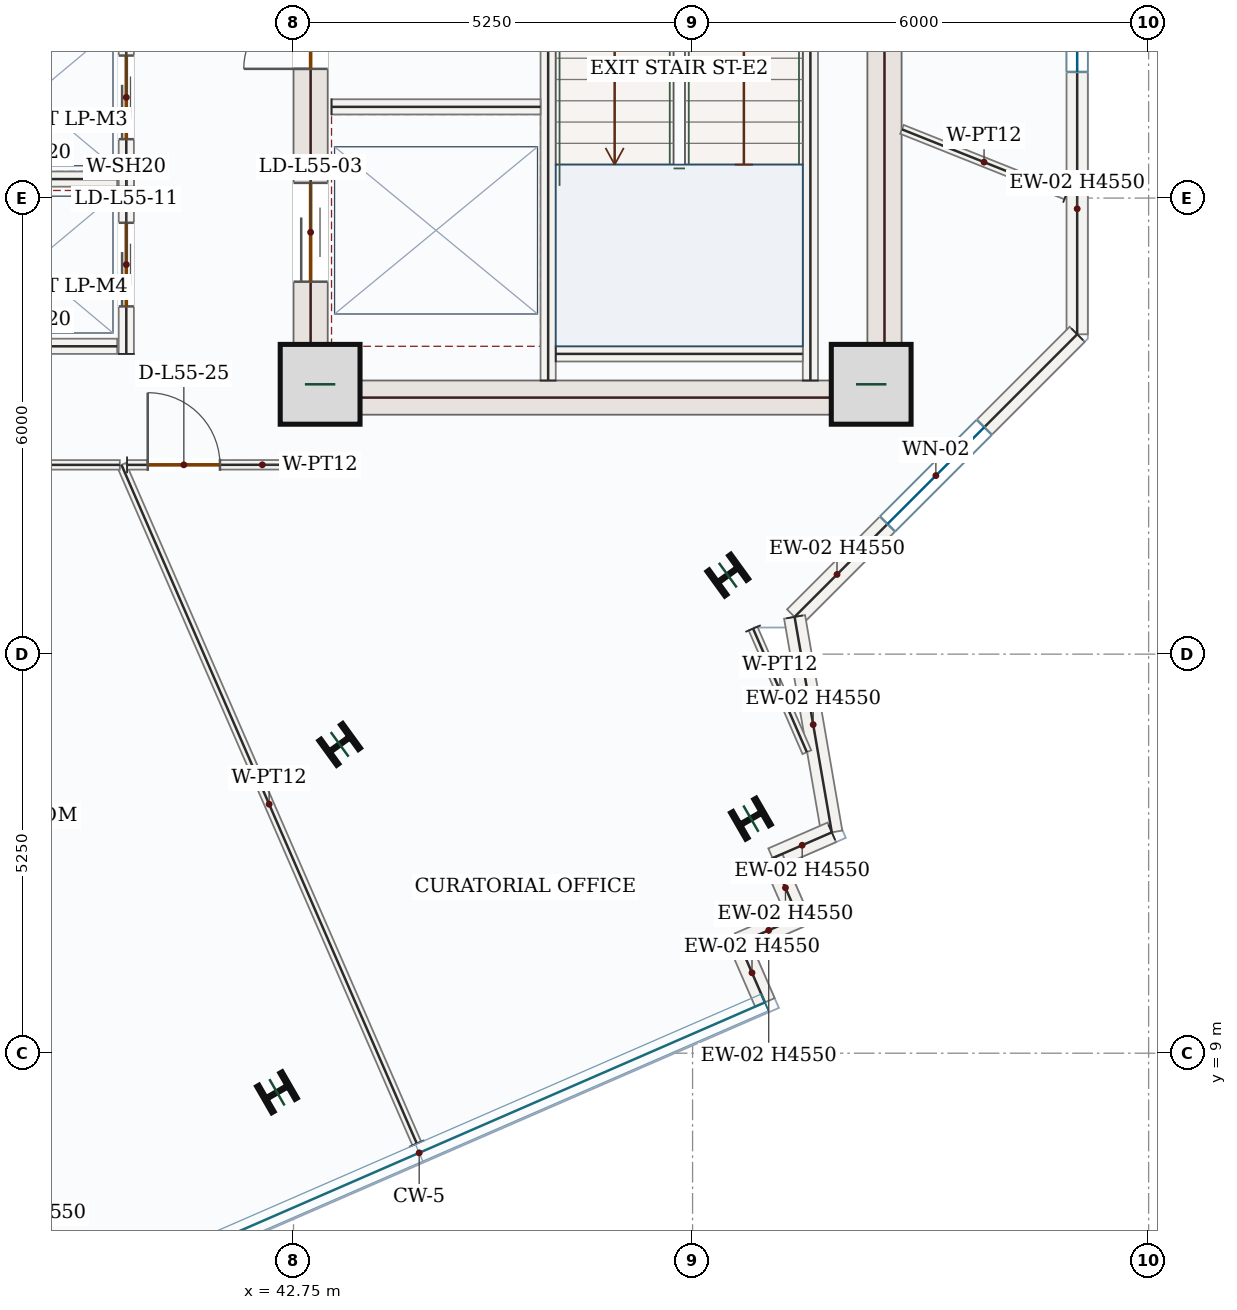
"""IFC4 building model, lengths in metres.
Left out: names, types, materials, properties, quantities, classifications, styles, units other than length and angle.
Written with IfcOpenShell. Run it as: python <this file> out.ifc"""

import sys

from ifc_helpers import new_model, si_unit, direction, frame, frame_2d, origin, origin_2d, place, context, subcontext, project, spatial, rectangle, i_section, extrude, source, transform, mapped, element, fill, save


model = new_model("IFC4")
c1 = context("Model", 3, precision=1e-05, world=origin(), true_north=direction((0.0, 1.0)))
c2 = subcontext(c1, "Body", "Model", "MODEL_VIEW")
j1 = project(units=[si_unit("LENGTHUNIT", "METRE"), si_unit("PLANEANGLEUNIT", "RADIAN")], contexts=[c1])
p1 = place(None, origin())
s1 = spatial("IfcSite", under=j1, at=p1, CompositionType="ELEMENT")
p2 = place(p1, origin())
s2 = spatial("IfcBuilding", under=s1, at=p2, CompositionType="ELEMENT")
p3 = place(p2, frame((0.0, 0.0, 234.3)))
s3 = spatial("IfcBuildingStorey", under=s2, at=p3, CompositionType="ELEMENT", Elevation=234.3)
p4 = place(p3, frame((42.975, 17.4, 0.0), z_axis=(0.0, 0.0, 1.0), x_axis=(0.0, 1.0, 0.0)))
e1 = element("IfcWall", 1, at=p4, inside=s3, PredefinedType="SHEAR", context=c2, shape_type="SweptSolid", body=[
    extrude(rectangle(XDim=8.55, YDim=0.45, at=frame_2d((4.275, 0.0))), origin(), (0.0, 0.0, 1.0), 4.55),
])
p5 = place(p4, frame((6.65, 0.0, 0.0)))
e2 = element("IfcOpeningElement", 2, at=p5, cuts=e1, PredefinedType="OPENING", context=c2, shape_type="SweptSolid", body=[
    extrude(rectangle(XDim=1.1, YDim=2.2, at=frame_2d((0.55, 1.1))), frame((0.0, 0.235, 0.0), z_axis=(0.0, -1.0, 0.0), x_axis=(1.0, 0.0, 0.0)), (0.0, 0.0, 1.0), 0.47),
])
p6 = place(p4, frame((1.75, 0.0, 0.0)))
e3 = element("IfcOpeningElement", 3, at=p6, cuts=e1, PredefinedType="OPENING", context=c2, shape_type="SweptSolid", body=[
    extrude(rectangle(XDim=1.3, YDim=2.2, at=frame_2d((0.65, 1.1))), frame((0.0, 0.235, 0.0), z_axis=(0.0, -1.0, 0.0), x_axis=(1.0, 0.0, 0.0)), (0.0, 0.0, 1.0), 0.47),
])
p7 = place(p4, frame((4.55, 0.0, 0.0)))
e4 = element("IfcOpeningElement", 4, at=p7, cuts=e1, PredefinedType="OPENING", context=c2, shape_type="SweptSolid", body=[
    extrude(rectangle(XDim=0.88, YDim=2.1, at=frame_2d((0.44, 1.05))), frame((0.0, 0.235, 0.0), z_axis=(0.0, -1.0, 0.0), x_axis=(1.0, 0.0, 0.0)), (0.0, 0.0, 1.0), 0.47),
])
m1 = source(origin(), c2, "Body", "SweptSolid", [
    extrude(rectangle(XDim=8.55, YDim=0.45, at=frame_2d((4.275, 0.0))), origin(), (0.0, 0.0, 1.0), 4.55),
])
p8 = place(p3, frame((50.525, 17.4, 0.0), z_axis=(0.0, 0.0, 1.0), x_axis=(0.0, 1.0, 0.0)))
e5 = element("IfcWall", 5, at=p8, inside=s3, PredefinedType="SHEAR", context=c2, shape_type="MappedRepresentation", body=[
    mapped(m1, transform((0.0, 0.0, 0.0), x_axis=(1.0, 0.0, 0.0), y_axis=(0.0, 1.0, 0.0), z_axis=(0.0, 0.0, 1.0), scale=1.0)),
])
m2 = source(origin(), c2, "Body", "SweptSolid", [
    extrude(rectangle(XDim=7.1, YDim=0.45, at=frame_2d((3.55, 0.0))), origin(), (0.0, 0.0, 1.0), 4.55),
])
p9 = place(p3, frame((43.2, 17.625, 0.0), z_axis=(0.0, 0.0, 1.0), x_axis=(1.0, 0.0, 0.0)))
e6 = element("IfcWall", 6, at=p9, inside=s3, PredefinedType="SHEAR", context=c2, shape_type="MappedRepresentation", body=[
    mapped(m2, transform((0.0, 0.0, 0.0), x_axis=(1.0, 0.0, 0.0), y_axis=(0.0, 1.0, 0.0), z_axis=(0.0, 0.0, 1.0), scale=1.0)),
])
m3 = source(origin(), c2, "Body", "SweptSolid", [
    extrude(rectangle(XDim=1.05, YDim=1.05, at=origin_2d()), origin(), (0.0, 0.0, 1.0), 4.8),
])
for number, where, z_axis, x_axis in (
    (7, (43.1, 17.8, 0.0), (0.0, 0.0, 1.0), (1.0, 0.0, 0.0)),
    (8, (50.35, 17.8, 0.0), (0.0, 0.0, 1.0), (1.0, 0.0, 0.0)),
):
    element("IfcColumn", number, at=place(p3, frame(where, z_axis=z_axis, x_axis=x_axis)), inside=s3, PredefinedType="COLUMN", context=c2, shape_type="MappedRepresentation", body=[
        mapped(m3, transform((0.0, 0.0, 0.0), x_axis=(1.0, 0.0, 0.0), y_axis=(0.0, 1.0, 0.0), z_axis=(0.0, 0.0, 1.0), scale=1.0)),
    ])
m4 = source(origin(), c2, "Body", "SweptSolid", [
    extrude(i_section(OverallWidth=0.399, OverallDepth=0.386, WebThickness=0.021, FlangeThickness=0.033, FilletRadius=0.018, at=origin_2d()), origin(), (0.0, 0.0, 1.0), 4.8),
])
for number, where, z_axis, x_axis in (
    (9, (43.357, 13.063, 0.0), (0.0, 0.0, 1.0), (-0.588, 0.809, 0.0)),
    (10, (48.464, 15.289, 0.0), (0.0, 0.0, 1.0), (-0.588, 0.809, 0.0)),
    (11, (42.532, 8.486, 0.0), (0.0, 0.0, 1.0), (-0.5, 0.866, 0.0)),
    (12, (48.768, 12.086, 0.0), (0.0, 0.0, 1.0), (-0.5, 0.866, 0.0)),
):
    element("IfcColumn", number, at=place(p3, frame(where, z_axis=z_axis, x_axis=x_axis)), inside=s3, PredefinedType="COLUMN", context=c2, shape_type="MappedRepresentation", body=[
        mapped(m4, transform((0.0, 0.0, 0.0), x_axis=(1.0, 0.0, 0.0), y_axis=(0.0, 1.0, 0.0), z_axis=(0.0, 0.0, 1.0), scale=1.0)),
    ])
p10 = place(p3, frame((53.06, 27.161, 0.0), z_axis=(0.0, 0.0, 1.0), x_axis=(0.0, -1.0, 0.0)))
e13 = element("IfcWall", 13, at=p10, inside=s3, PredefinedType="SOLIDWALL", context=c2, shape_type="SweptSolid", body=[
    extrude(rectangle(XDim=8.703, YDim=0.28, at=frame_2d((4.351, 0.0))), origin(), (0.0, 0.0, 1.0), 4.55),
])
p11 = place(p10, frame((3.451, 0.0, 0.85)))
e14 = element("IfcOpeningElement", 14, at=p11, cuts=e13, PredefinedType="OPENING", context=c2, shape_type="SweptSolid", body=[
    extrude(rectangle(XDim=1.8, YDim=1.75, at=frame_2d((0.9, 0.875))), frame((0.0, 0.15, 0.0), z_axis=(0.0, -1.0, 0.0), x_axis=(1.0, 0.0, 0.0)), (0.0, 0.0, 1.0), 0.3),
])
p12 = place(p3, frame((53.06, 18.458, 0.0), z_axis=(0.0, 0.0, 1.0), x_axis=(-0.707106781187, -0.707106781187, 0.0)))
e15 = element("IfcWall", 15, at=p12, inside=s3, PredefinedType="SOLIDWALL", context=c2, shape_type="SweptSolid", body=[
    extrude(rectangle(XDim=5.258, YDim=0.28, at=frame_2d((2.629, 0.0))), origin(), (0.0, 0.0, 1.0), 4.55),
])
p13 = place(p12, frame((1.729, 0.0, 0.85)))
e16 = element("IfcOpeningElement", 16, at=p13, cuts=e15, PredefinedType="OPENING", context=c2, shape_type="SweptSolid", body=[
    extrude(rectangle(XDim=1.8, YDim=1.75, at=frame_2d((0.9, 0.875))), frame((0.0, 0.15, 0.0), z_axis=(0.0, -1.0, 0.0), x_axis=(1.0, 0.0, 0.0)), (0.0, 0.0, 1.0), 0.3),
])
m5 = source(origin(), c2, "Body", "SweptSolid", [
    extrude(rectangle(XDim=2.876, YDim=0.28, at=frame_2d((1.438, 0.0))), origin(), (0.0, 0.0, 1.0), 4.55),
])
p14 = place(p3, frame((49.342, 14.74, 0.0), z_axis=(0.0, 0.0, 1.0), x_axis=(0.170259342901, -0.985399287677, 0.0)))
e17 = element("IfcWall", 17, at=p14, inside=s3, PredefinedType="SOLIDWALL", context=c2, shape_type="MappedRepresentation", body=[
    mapped(m5, transform((0.0, 0.0, 0.0), x_axis=(1.0, 0.0, 0.0), y_axis=(0.0, 1.0, 0.0), z_axis=(0.0, 0.0, 1.0), scale=1.0)),
])
m6 = source(origin(), c2, "Body", "SweptSolid", [
    extrude(rectangle(XDim=0.85, YDim=0.28, at=frame_2d((0.425, 0.0))), origin(), (0.0, 0.0, 1.0), 4.55),
])
p15 = place(p3, frame((49.832, 11.906, 0.0), z_axis=(0.0, 0.0, 1.0), x_axis=(-0.916841582309, -0.399251190291, 0.0)))
e18 = element("IfcWall", 18, at=p15, inside=s3, PredefinedType="SOLIDWALL", context=c2, shape_type="MappedRepresentation", body=[
    mapped(m6, transform((0.0, 0.0, 0.0), x_axis=(1.0, 0.0, 0.0), y_axis=(0.0, 1.0, 0.0), z_axis=(0.0, 0.0, 1.0), scale=1.0)),
])
m7 = source(origin(), c2, "Body", "SweptSolid", [
    extrude(rectangle(XDim=0.85, YDim=0.28, at=frame_2d((0.425, 0.0))), origin(), (0.0, 0.0, 1.0), 4.55),
])
for number, where, z_axis, x_axis in (
    (19, (49.052, 11.566, 0.0), (0.0, 0.0, 1.0), (0.399, -0.917, 0.0)),
    (20, (49.392, 10.787, 0.0), (0.0, 0.0, 1.0), (-0.917, -0.399, 0.0)),
):
    element("IfcWall", number, at=place(p3, frame(where, z_axis=z_axis, x_axis=x_axis)), inside=s3, PredefinedType="SOLIDWALL", context=c2, shape_type="MappedRepresentation", body=[
        mapped(m7, transform((0.0, 0.0, 0.0), x_axis=(1.0, 0.0, 0.0), y_axis=(0.0, 1.0, 0.0), z_axis=(0.0, 0.0, 1.0), scale=1.0)),
    ])
p16 = place(p3, frame((48.612, 10.448, 0.0), z_axis=(0.0, 0.0, 1.0), x_axis=(0.398904626351, -0.916992420403, 0.0)))
e21 = element("IfcWall", 21, at=p16, inside=s3, PredefinedType="SOLIDWALL", context=c2, shape_type="MappedRepresentation", body=[
    mapped(m6, transform((0.0, 0.0, 0.0), x_axis=(1.0, 0.0, 0.0), y_axis=(0.0, 1.0, 0.0), z_axis=(0.0, 0.0, 1.0), scale=1.0)),
])
m8 = source(origin(), c2, "Body", "SweptSolid", [
    extrude(rectangle(XDim=7.87, YDim=0.2, at=frame_2d((3.935, 0.0))), origin(), (0.0, 0.0, 1.0), 4.55),
])
p17 = place(p3, frame((49.55, 17.85, 0.0), z_axis=(0.0, 0.0, 1.0), x_axis=(0.0, 1.0, 0.0)))
e22 = element("IfcWall", 22, at=p17, inside=s3, PredefinedType="SOLIDWALL", context=c2, shape_type="MappedRepresentation", body=[
    mapped(m8, transform((0.0, 0.0, 0.0), x_axis=(1.0, 0.0, 0.0), y_axis=(0.0, 1.0, 0.0), z_axis=(0.0, 0.0, 1.0), scale=1.0)),
])
p18 = place(p3, frame((46.1, 17.85, 0.0), z_axis=(0.0, 0.0, 1.0), x_axis=(0.0, 1.0, 0.0)))
e23 = element("IfcWall", 23, at=p18, inside=s3, PredefinedType="SOLIDWALL", context=c2, shape_type="SweptSolid", body=[
    extrude(rectangle(XDim=8.0, YDim=0.2, at=frame_2d((4.0, 0.0))), origin(), (0.0, 0.0, 1.0), 4.55),
])
p19 = place(p18, frame((6.3, 0.0, 0.0)))
e24 = element("IfcOpeningElement", 24, at=p19, cuts=e23, PredefinedType="OPENING", context=c2, shape_type="SweptSolid", body=[
    extrude(rectangle(XDim=1.05, YDim=2.15, at=frame_2d((0.525, 1.075))), frame((0.0, 0.11, 0.0), z_axis=(0.0, -1.0, 0.0), x_axis=(1.0, 0.0, 0.0)), (0.0, 0.0, 1.0), 0.22),
])
m9 = source(origin(), c2, "Body", "SweptSolid", [
    extrude(rectangle(XDim=3.25, YDim=0.2, at=frame_2d((1.625, 0.0))), origin(), (0.0, 0.0, 1.0), 4.55),
])
p20 = place(p3, frame((46.2, 18.2, 0.0), z_axis=(0.0, 0.0, 1.0), x_axis=(1.0, 0.0, 0.0)))
e25 = element("IfcWall", 25, at=p20, inside=s3, PredefinedType="SOLIDWALL", context=c2, shape_type="MappedRepresentation", body=[
    mapped(m9, transform((0.0, 0.0, 0.0), x_axis=(1.0, 0.0, 0.0), y_axis=(0.0, 1.0, 0.0), z_axis=(0.0, 0.0, 1.0), scale=1.0)),
])
m10 = source(origin(), c2, "Body", "SweptSolid", [
    extrude(rectangle(XDim=2.75, YDim=0.2, at=frame_2d((1.375, 0.0))), origin(), (0.0, 0.0, 1.0), 4.55),
])
p21 = place(p3, frame((43.25, 21.45, 0.0), z_axis=(0.0, 0.0, 1.0), x_axis=(1.0, 0.0, 0.0)))
e26 = element("IfcWall", 26, at=p21, inside=s3, PredefinedType="SOLIDWALL", context=c2, shape_type="MappedRepresentation", body=[
    mapped(m10, transform((0.0, 0.0, 0.0), x_axis=(1.0, 0.0, 0.0), y_axis=(0.0, 1.0, 0.0), z_axis=(0.0, 0.0, 1.0), scale=1.0)),
])
p22 = place(p3, frame((40.55, 20.4, 0.0), z_axis=(0.0, 0.0, 1.0), x_axis=(0.0, 1.0, 0.0)))
e27 = element("IfcWall", 27, at=p22, inside=s3, PredefinedType="SOLIDWALL", context=c2, shape_type="SweptSolid", body=[
    extrude(rectangle(XDim=2.35, YDim=0.2, at=frame_2d((1.175, 0.0))), origin(), (0.0, 0.0, 1.0), 4.55),
])
p23 = place(p22, frame((0.625, 0.0, 0.0)))
e28 = element("IfcOpeningElement", 28, at=p23, cuts=e27, PredefinedType="OPENING", context=c2, shape_type="SweptSolid", body=[
    extrude(rectangle(XDim=1.1, YDim=2.15, at=frame_2d((0.55, 1.075))), frame((0.0, 0.11, 0.0), z_axis=(0.0, -1.0, 0.0), x_axis=(1.0, 0.0, 0.0)), (0.0, 0.0, 1.0), 0.22),
])
m11 = source(origin(), c2, "Body", "SweptSolid", [
    extrude(rectangle(XDim=2.26, YDim=0.2, at=frame_2d((1.13, 0.0))), origin(), (0.0, 0.0, 1.0), 4.55),
])
p24 = place(p3, frame((38.17, 20.5, 0.0), z_axis=(0.0, 0.0, 1.0), x_axis=(1.0, 0.0, 0.0)))
e29 = element("IfcWall", 29, at=p24, inside=s3, PredefinedType="SOLIDWALL", context=c2, shape_type="MappedRepresentation", body=[
    mapped(m11, transform((0.0, 0.0, 0.0), x_axis=(1.0, 0.0, 0.0), y_axis=(0.0, 1.0, 0.0), z_axis=(0.0, 0.0, 1.0), scale=1.0)),
])
p25 = place(p3, frame((40.55, 18.2, 0.0), z_axis=(0.0, 0.0, 1.0), x_axis=(0.0, 1.0, 0.0)))
e30 = element("IfcWall", 30, at=p25, inside=s3, PredefinedType="SOLIDWALL", context=c2, shape_type="SweptSolid", body=[
    extrude(rectangle(XDim=2.35, YDim=0.2, at=frame_2d((1.175, 0.0))), origin(), (0.0, 0.0, 1.0), 4.55),
])
p26 = place(p25, frame((0.625, 0.0, 0.0)))
e31 = element("IfcOpeningElement", 31, at=p26, cuts=e30, PredefinedType="OPENING", context=c2, shape_type="SweptSolid", body=[
    extrude(rectangle(XDim=1.1, YDim=2.15, at=frame_2d((0.55, 1.075))), frame((0.0, 0.11, 0.0), z_axis=(0.0, -1.0, 0.0), x_axis=(1.0, 0.0, 0.0)), (0.0, 0.0, 1.0), 0.22),
])
p27 = place(p3, frame((38.17, 18.3, 0.0), z_axis=(0.0, 0.0, 1.0), x_axis=(1.0, 0.0, 0.0)))
e32 = element("IfcWall", 32, at=p27, inside=s3, PredefinedType="SOLIDWALL", context=c2, shape_type="MappedRepresentation", body=[
    mapped(m11, transform((0.0, 0.0, 0.0), x_axis=(1.0, 0.0, 0.0), y_axis=(0.0, 1.0, 0.0), z_axis=(0.0, 0.0, 1.0), scale=1.0)),
])
m12 = source(origin(), c2, "Body", "SweptSolid", [
    extrude(rectangle(XDim=2.326, YDim=0.125, at=frame_2d((1.163, 0.0))), origin(), (0.0, 0.0, 1.0), 4.55),
])
p28 = place(p3, frame((52.915, 20.292, 0.0), z_axis=(0.0, 0.0, 1.0), x_axis=(-0.928809338362, 0.370557975183, 0.0)))
e33 = element("IfcWall", 33, at=p28, inside=s3, PredefinedType="PARTITIONING", context=c2, shape_type="MappedRepresentation", body=[
    mapped(m12, transform((0.0, 0.0, 0.0), x_axis=(1.0, 0.0, 0.0), y_axis=(0.0, 1.0, 0.0), z_axis=(0.0, 0.0, 1.0), scale=1.0)),
])
m13 = source(origin(), c2, "Body", "SweptSolid", [
    extrude(rectangle(XDim=9.737, YDim=0.125, at=frame_2d((4.869, 0.0))), origin(), (0.0, 0.0, 1.0), 4.55),
])
p29 = place(p3, frame((44.372, 7.812, 0.0), z_axis=(0.0, 0.0, 1.0), x_axis=(-0.399021313491, 0.916941651022, 0.0)))
e34 = element("IfcWall", 34, at=p29, inside=s3, PredefinedType="PARTITIONING", context=c2, shape_type="MappedRepresentation", body=[
    mapped(m13, transform((0.0, 0.0, 0.0), x_axis=(1.0, 0.0, 0.0), y_axis=(0.0, 1.0, 0.0), z_axis=(0.0, 0.0, 1.0), scale=1.0)),
])
p30 = place(p3, frame((40.56, 16.74, 0.0), z_axis=(0.0, 0.0, 1.0), x_axis=(0.999999844124, 0.000558347205, 0.0)))
e35 = element("IfcWall", 35, at=p30, inside=s3, PredefinedType="PARTITIONING", context=c2, shape_type="SweptSolid", body=[
    extrude(rectangle(XDim=2.186, YDim=0.125, at=frame_2d((1.093, 0.0))), origin(), (0.0, 0.0, 1.0), 4.55),
])
p31 = place(p30, frame((0.272, 0.0, 0.0)))
e36 = element("IfcOpeningElement", 36, at=p31, cuts=e35, PredefinedType="OPENING", context=c2, shape_type="SweptSolid", body=[
    extrude(rectangle(XDim=0.95, YDim=2.15, at=frame_2d((0.475, 1.075))), frame((0.0, 0.073, 0.0), z_axis=(0.0, -1.0, 0.0), x_axis=(1.0, 0.0, 0.0)), (0.0, 0.0, 1.0), 0.145),
])
m14 = source(origin(), c2, "Body", "SweptSolid", [
    extrude(rectangle(XDim=1.773, YDim=0.125, at=frame_2d((0.887, 0.0))), origin(), (0.0, 0.0, 1.0), 4.55),
])
p32 = place(p3, frame((48.796, 14.586, 0.0), z_axis=(0.0, 0.0, 1.0), x_axis=(0.399113704868, -0.916901439952, 0.0)))
e37 = element("IfcWall", 37, at=p32, inside=s3, PredefinedType="PARTITIONING", context=c2, shape_type="MappedRepresentation", body=[
    mapped(m14, transform((0.0, 0.0, 0.0), x_axis=(1.0, 0.0, 0.0), y_axis=(0.0, 1.0, 0.0), z_axis=(0.0, 0.0, 1.0), scale=1.0)),
])
p33 = place(p3, frame((31.976, 16.74, 0.0), z_axis=(0.0, 0.0, 1.0), x_axis=(1.0, 0.0, 0.0)))
e38 = element("IfcWall", 38, at=p33, inside=s3, PredefinedType="PARTITIONING", context=c2, shape_type="SweptSolid", body=[
    extrude(rectangle(XDim=8.488, YDim=0.125, at=frame_2d((4.244, 0.0))), origin(), (0.0, 0.0, 1.0), 4.55),
])
p34 = place(p33, frame((3.769, 0.0, 0.0)))
e39 = element("IfcOpeningElement", 39, at=p34, cuts=e38, PredefinedType="OPENING", context=c2, shape_type="SweptSolid", body=[
    extrude(rectangle(XDim=0.95, YDim=2.15, at=frame_2d((0.475, 1.075))), frame((0.0, 0.073, 0.0), z_axis=(0.0, -1.0, 0.0), x_axis=(1.0, 0.0, 0.0)), (0.0, 0.0, 1.0), 0.145),
])
m15 = source(origin(), c2, "Body", "SweptSolid", [
    extrude(rectangle(XDim=1.8, YDim=1.75, at=frame_2d((0.9, 0.875))), frame((0.0, 0.03, 0.0), z_axis=(0.0, -1.0, 0.0), x_axis=(1.0, 0.0, 0.0)), (0.0, 0.0, 1.0), 0.06),
])
p35 = place(p11, origin())
e40 = element("IfcWindow", 40, at=p35, inside=s3, PartitioningType="DOUBLE_PANEL_VERTICAL", PredefinedType="WINDOW", context=c2, shape_type="MappedRepresentation", body=[
    mapped(m15, transform((0.0, 0.0, 0.0), x_axis=(1.0, 0.0, 0.0), y_axis=(0.0, 1.0, 0.0), z_axis=(0.0, 0.0, 1.0), scale=1.0)),
])
fill(e14, e40)
p36 = place(p13, origin())
e41 = element("IfcWindow", 41, at=p36, inside=s3, PartitioningType="DOUBLE_PANEL_VERTICAL", PredefinedType="WINDOW", context=c2, shape_type="MappedRepresentation", body=[
    mapped(m15, transform((0.0, 0.0, 0.0), x_axis=(1.0, 0.0, 0.0), y_axis=(0.0, 1.0, 0.0), z_axis=(0.0, 0.0, 1.0), scale=1.0)),
])
fill(e16, e41)
m16 = source(origin(), c2, "Body", "SweptSolid", [
    extrude(rectangle(XDim=1.3, YDim=2.2, at=frame_2d((0.65, 1.1))), frame((0.0, 0.025, 0.0), z_axis=(0.0, -1.0, 0.0), x_axis=(1.0, 0.0, 0.0)), (0.0, 0.0, 1.0), 0.05),
])
p37 = place(p6, origin())
e42 = element("IfcDoor", 42, at=p37, inside=s3, OperationType="DOUBLE_DOOR_SLIDING", PredefinedType="DOOR", context=c2, shape_type="MappedRepresentation", body=[
    mapped(m16, transform((0.0, 0.0, 0.0), x_axis=(1.0, 0.0, 0.0), y_axis=(0.0, 1.0, 0.0), z_axis=(0.0, 0.0, 1.0), scale=1.0)),
])
fill(e3, e42)
m17 = source(origin(), c2, "Body", "SweptSolid", [
    extrude(rectangle(XDim=0.88, YDim=2.1, at=frame_2d((0.44, 1.05))), frame((0.0, 0.025, 0.0), z_axis=(0.0, -1.0, 0.0), x_axis=(1.0, 0.0, 0.0)), (0.0, 0.0, 1.0), 0.05),
])
p38 = place(p7, origin())
e43 = element("IfcDoor", 43, at=p38, inside=s3, OperationType="SINGLE_SWING_LEFT", PredefinedType="DOOR", context=c2, shape_type="MappedRepresentation", body=[
    mapped(m17, transform((0.0, 0.0, 0.0), x_axis=(1.0, 0.0, 0.0), y_axis=(0.0, 1.0, 0.0), z_axis=(0.0, 0.0, 1.0), scale=1.0)),
])
fill(e4, e43)
m18 = source(origin(), c2, "Body", "SweptSolid", [
    extrude(rectangle(XDim=1.1, YDim=2.15, at=frame_2d((0.55, 1.075))), frame((0.0, 0.025, 0.0), z_axis=(0.0, -1.0, 0.0), x_axis=(1.0, 0.0, 0.0)), (0.0, 0.0, 1.0), 0.05),
])
p39 = place(p23, origin())
e44 = element("IfcDoor", 44, at=p39, inside=s3, OperationType="DOUBLE_DOOR_SLIDING", PredefinedType="DOOR", context=c2, shape_type="MappedRepresentation", body=[
    mapped(m18, transform((0.0, 0.0, 0.0), x_axis=(1.0, 0.0, 0.0), y_axis=(0.0, 1.0, 0.0), z_axis=(0.0, 0.0, 1.0), scale=1.0)),
])
fill(e28, e44)
p40 = place(p26, origin())
e45 = element("IfcDoor", 45, at=p40, inside=s3, OperationType="DOUBLE_DOOR_SLIDING", PredefinedType="DOOR", context=c2, shape_type="MappedRepresentation", body=[
    mapped(m18, transform((0.0, 0.0, 0.0), x_axis=(1.0, 0.0, 0.0), y_axis=(0.0, 1.0, 0.0), z_axis=(0.0, 0.0, 1.0), scale=1.0)),
])
fill(e31, e45)
m19 = source(origin(), c2, "Body", "SweptSolid", [
    extrude(rectangle(XDim=0.95, YDim=2.15, at=frame_2d((0.475, 1.075))), frame((0.0, 0.025, 0.0), z_axis=(0.0, -1.0, 0.0), x_axis=(1.0, 0.0, 0.0)), (0.0, 0.0, 1.0), 0.05),
])
p41 = place(p31, origin())
e46 = element("IfcDoor", 46, at=p41, inside=s3, OperationType="SINGLE_SWING_LEFT", PredefinedType="DOOR", context=c2, shape_type="MappedRepresentation", body=[
    mapped(m19, transform((0.0, 0.0, 0.0), x_axis=(1.0, 0.0, 0.0), y_axis=(0.0, 1.0, 0.0), z_axis=(0.0, 0.0, 1.0), scale=1.0)),
])
fill(e36, e46)
save(model, sys.argv[1])
